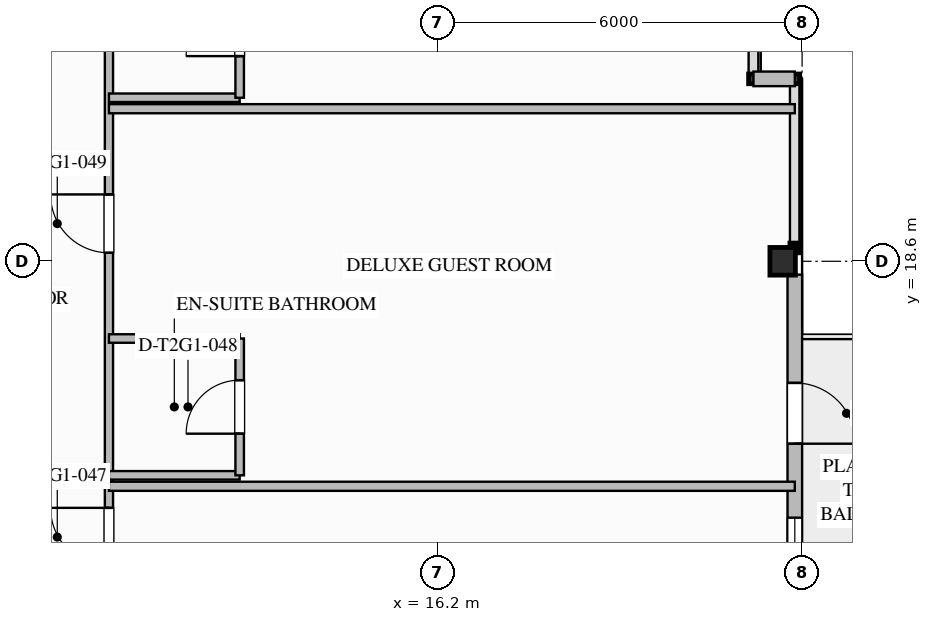
"""IFC4 building model, lengths in metres.
Left out: names, types, materials, properties, quantities, classifications, styles, units other than length and angle.
Written with IfcOpenShell. Run it as: python <this file> out.ifc"""

import sys

from ifc_helpers import new_model, si_unit, direction, frame, frame_2d, origin, origin_2d, place, context, subcontext, project, spatial, rectangle, i_section, extrude, element, fill, save


model = new_model("IFC4")
c1 = context("Model", 3, precision=1e-05, world=origin(), true_north=direction((0.0, 1.0)))
c2 = subcontext(c1, "Body", "Model", "MODEL_VIEW")
j1 = project(units=[si_unit("LENGTHUNIT", "METRE"), si_unit("PLANEANGLEUNIT", "RADIAN")], contexts=[c1])
p1 = place(None, origin())
s1 = spatial("IfcSite", under=j1, at=p1, CompositionType="ELEMENT")
p2 = place(p1, origin())
s2 = spatial("IfcBuilding", under=s1, at=p2, CompositionType="ELEMENT")
p3 = place(p2, frame((0.0, 0.0, 91.8)))
s3 = spatial("IfcBuildingStorey", under=s2, at=p3, CompositionType="ELEMENT", Elevation=91.8)
p4 = place(p3, frame((21.88, 18.6, 0.0), z_axis=(0.0, 0.0, 1.0), x_axis=(1.0, 0.0, 0.0)))
e1 = element("IfcColumn", 1, at=p4, inside=s3, PredefinedType="COLUMN", context=c2, shape_type="SweptSolid", body=[
    extrude(i_section(OverallWidth=0.418, OverallDepth=0.455, WebThickness=0.042, FlangeThickness=0.068, FilletRadius=0.03, at=origin_2d()), origin(), (0.0, 0.0, 1.0), 3.497),
])
p5 = place(p3, frame((22.08, 18.38, 0.0), z_axis=(0.0, 0.0, 1.0), x_axis=(0.0, -1.0, 0.0)))
e2 = element("IfcWall", 2, at=p5, inside=s3, PredefinedType="STANDARD", context=c2, shape_type="SweptSolid", body=[
    extrude(rectangle(XDim=7.361, YDim=0.24, at=frame_2d((3.68, 0.0))), origin(), (0.0, 0.0, 1.0), 2.629),
])
p6 = place(p5, frame((1.781, 0.0, 0.0)))
e3 = element("IfcOpeningElement", 3, at=p6, cuts=e2, PredefinedType="OPENING", context=c2, shape_type="SweptSolid", body=[
    extrude(rectangle(XDim=1.0, YDim=2.2, at=frame_2d((0.5, 1.1))), frame((0.0, 0.13, 0.0), z_axis=(0.0, -1.0, 0.0), x_axis=(1.0, 0.0, 0.0)), (0.0, 0.0, 1.0), 0.26),
])
p7 = place(p5, frame((3.997, 0.0, 0.75)))
e4 = element("IfcOpeningElement", 4, at=p7, cuts=e2, PredefinedType="OPENING", context=c2, shape_type="SweptSolid", body=[
    extrude(rectangle(XDim=1.8, YDim=1.779, at=frame_2d((0.9, 0.89))), frame((0.0, 0.13, 0.0), z_axis=(0.0, -1.0, 0.0), x_axis=(1.0, 0.0, 0.0)), (0.0, 0.0, 1.0), 0.26),
])
p8 = place(p3, frame((21.4, 21.6, 0.0), z_axis=(0.0, 0.0, 1.0), x_axis=(1.0, 0.0, 0.0)))
e5 = element("IfcWall", 5, at=p8, inside=s3, PredefinedType="STANDARD", context=c2, shape_type="SweptSolid", body=[
    extrude(rectangle(XDim=0.68, YDim=0.24, at=frame_2d((0.34, 0.0))), origin(), (0.0, 0.0, 1.0), 3.24),
])
p9 = place(p3, frame((10.8, 10.8, 0.0), z_axis=(0.0, 0.0, 1.0), x_axis=(0.0, 1.0, 0.0)))
e6 = element("IfcWall", 6, at=p9, inside=s3, PredefinedType="PARTITIONING", context=c2, shape_type="SweptSolid", body=[
    extrude(rectangle(XDim=32.4, YDim=0.135, at=frame_2d((16.2, 0.0))), origin(), (0.0, 0.0, 1.0), 3.24),
])
p10 = place(p9, frame((2.785, 0.0, 0.0)))
e7 = element("IfcOpeningElement", 7, at=p10, cuts=e6, PredefinedType="OPENING", context=c2, shape_type="SweptSolid", body=[
    extrude(rectangle(XDim=0.96, YDim=2.15, at=frame_2d((0.48, 1.075))), frame((0.0, 0.077, 0.0), z_axis=(0.0, -1.0, 0.0), x_axis=(1.0, 0.0, 0.0)), (0.0, 0.0, 1.0), 0.155),
])
p11 = place(p9, frame((7.939, 0.0, 0.0)))
e8 = element("IfcOpeningElement", 8, at=p11, cuts=e6, PredefinedType="OPENING", context=c2, shape_type="SweptSolid", body=[
    extrude(rectangle(XDim=0.96, YDim=2.15, at=frame_2d((0.48, 1.075))), frame((0.0, 0.077, 0.0), z_axis=(0.0, -1.0, 0.0), x_axis=(1.0, 0.0, 0.0)), (0.0, 0.0, 1.0), 0.155),
])
p12 = place(p9, frame((13.99, 0.0, 0.0)))
e9 = element("IfcOpeningElement", 9, at=p12, cuts=e6, PredefinedType="OPENING", context=c2, shape_type="SweptSolid", body=[
    extrude(rectangle(XDim=0.96, YDim=2.15, at=frame_2d((0.48, 1.075))), frame((0.0, 0.077, 0.0), z_axis=(0.0, -1.0, 0.0), x_axis=(1.0, 0.0, 0.0)), (0.0, 0.0, 1.0), 0.155),
])
p13 = place(p9, frame((18.635, 0.0, 0.0)))
e10 = element("IfcOpeningElement", 10, at=p13, cuts=e6, PredefinedType="OPENING", context=c2, shape_type="SweptSolid", body=[
    extrude(rectangle(XDim=1.02, YDim=2.15, at=frame_2d((0.51, 1.075))), frame((0.0, 0.077, 0.0), z_axis=(0.0, -1.0, 0.0), x_axis=(1.0, 0.0, 0.0)), (0.0, 0.0, 1.0), 0.155),
])
p14 = place(p9, frame((25.281, 0.0, 0.0)))
e11 = element("IfcOpeningElement", 11, at=p14, cuts=e6, PredefinedType="OPENING", context=c2, shape_type="SweptSolid", body=[
    extrude(rectangle(XDim=0.96, YDim=2.15, at=frame_2d((0.48, 1.075))), frame((0.0, 0.077, 0.0), z_axis=(0.0, -1.0, 0.0), x_axis=(1.0, 0.0, 0.0)), (0.0, 0.0, 1.0), 0.155),
])
p15 = place(p9, frame((30.435, 0.0, 0.0)))
e12 = element("IfcOpeningElement", 12, at=p15, cuts=e6, PredefinedType="OPENING", context=c2, shape_type="SweptSolid", body=[
    extrude(rectangle(XDim=0.96, YDim=2.15, at=frame_2d((0.48, 1.075))), frame((0.0, 0.077, 0.0), z_axis=(0.0, -1.0, 0.0), x_axis=(1.0, 0.0, 0.0)), (0.0, 0.0, 1.0), 0.155),
])
p16 = place(p3, frame((10.8, 14.9, 0.0), z_axis=(0.0, 0.0, 1.0), x_axis=(1.0, 0.0, 0.0)))
e13 = element("IfcWall", 13, at=p16, inside=s3, PredefinedType="PARTITIONING", context=c2, shape_type="SweptSolid", body=[
    extrude(rectangle(XDim=11.28, YDim=0.15, at=frame_2d((5.64, 0.0))), origin(), (0.0, 0.0, 1.0), 2.765),
])
for number, where, z_axis, x_axis in (
    (14, (10.8, 15.08, 0.0), (0.0, 0.0, 1.0), (1.0, 0.0, 0.0)),
    (15, (10.8, 17.33, 0.0), (0.0, 0.0, 1.0), (1.0, 0.0, 0.0)),
):
    element("IfcWall", number, at=place(p3, frame(where, z_axis=z_axis, x_axis=x_axis)), inside=s3, PredefinedType="PLUMBINGWALL", context=c2, shape_type="SweptSolid", body=[
        extrude(rectangle(XDim=2.15, YDim=0.14, at=frame_2d((1.075, 0.0))), origin(), (0.0, 0.0, 1.0), 3.24),
    ])
p17 = place(p3, frame((12.95, 15.08, 0.0), z_axis=(0.0, 0.0, 1.0), x_axis=(0.0, 1.0, 0.0)))
e16 = element("IfcWall", 16, at=p17, inside=s3, PredefinedType="PLUMBINGWALL", context=c2, shape_type="SweptSolid", body=[
    extrude(rectangle(XDim=2.25, YDim=0.14, at=frame_2d((1.125, 0.0))), origin(), (0.0, 0.0, 1.0), 3.24),
])
p18 = place(p17, frame((0.685, 0.0, 0.0)))
e17 = element("IfcOpeningElement", 17, at=p18, cuts=e16, PredefinedType="OPENING", context=c2, shape_type="SweptSolid", body=[
    extrude(rectangle(XDim=0.88, YDim=2.1, at=frame_2d((0.44, 1.05))), frame((0.0, 0.08, 0.0), z_axis=(0.0, -1.0, 0.0), x_axis=(1.0, 0.0, 0.0)), (0.0, 0.0, 1.0), 0.16),
])
p19 = place(p3, frame((10.8, 21.109, 0.0), z_axis=(0.0, 0.0, 1.0), x_axis=(1.0, 0.0, 0.0)))
e18 = element("IfcWall", 18, at=p19, inside=s3, PredefinedType="PARTITIONING", context=c2, shape_type="SweptSolid", body=[
    extrude(rectangle(XDim=11.28, YDim=0.15, at=frame_2d((5.64, 0.0))), origin(), (0.0, 0.0, 1.0), 3.24),
])
p20 = place(p3, frame((10.8, 21.289, 0.0), z_axis=(0.0, 0.0, 1.0), x_axis=(1.0, 0.0, 0.0)))
e19 = element("IfcWall", 19, at=p20, inside=s3, PredefinedType="PLUMBINGWALL", context=c2, shape_type="SweptSolid", body=[
    extrude(rectangle(XDim=2.15, YDim=0.14, at=frame_2d((1.075, 0.0))), origin(), (0.0, 0.0, 1.0), 3.24),
])
p21 = place(p3, frame((12.95, 21.289, 0.0), z_axis=(0.0, 0.0, 1.0), x_axis=(0.0, 1.0, 0.0)))
e20 = element("IfcWall", 20, at=p21, inside=s3, PredefinedType="PLUMBINGWALL", context=c2, shape_type="SweptSolid", body=[
    extrude(rectangle(XDim=2.25, YDim=0.14, at=frame_2d((1.125, 0.0))), origin(), (0.0, 0.0, 1.0), 3.24),
])
p22 = place(p21, frame((0.685, 0.0, 0.0)))
e21 = element("IfcOpeningElement", 21, at=p22, cuts=e20, PredefinedType="OPENING", context=c2, shape_type="SweptSolid", body=[
    extrude(rectangle(XDim=0.88, YDim=2.1, at=frame_2d((0.44, 1.05))), frame((0.0, 0.08, 0.0), z_axis=(0.0, -1.0, 0.0), x_axis=(1.0, 0.0, 0.0)), (0.0, 0.0, 1.0), 0.16),
])
p23 = place(p6, origin())
e22 = element("IfcDoor", 22, at=p23, inside=s3, OperationType="SINGLE_SWING_RIGHT", PredefinedType="DOOR", context=c2, shape_type="SweptSolid", body=[
    extrude(rectangle(XDim=1.0, YDim=2.2, at=frame_2d((0.5, 1.1))), frame((0.0, 0.025, 0.0), z_axis=(0.0, -1.0, 0.0), x_axis=(1.0, 0.0, 0.0)), (0.0, 0.0, 1.0), 0.05),
])
fill(e3, e22)
p24 = place(p7, origin())
e23 = element("IfcWindow", 23, at=p24, inside=s3, PartitioningType="SINGLE_PANEL", PredefinedType="WINDOW", context=c2, shape_type="SweptSolid", body=[
    extrude(rectangle(XDim=1.8, YDim=1.779, at=frame_2d((0.9, 0.89))), frame((0.0, 0.03, 0.0), z_axis=(0.0, -1.0, 0.0), x_axis=(1.0, 0.0, 0.0)), (0.0, 0.0, 1.0), 0.06),
])
fill(e4, e23)
p25 = place(p10, origin())
e24 = element("IfcDoor", 24, at=p25, inside=s3, OperationType="SINGLE_SWING_RIGHT", PredefinedType="DOOR", context=c2, shape_type="SweptSolid", body=[
    extrude(rectangle(XDim=0.96, YDim=2.15, at=frame_2d((0.48, 1.075))), frame((0.0, 0.025, 0.0), z_axis=(0.0, -1.0, 0.0), x_axis=(1.0, 0.0, 0.0)), (0.0, 0.0, 1.0), 0.05),
])
fill(e7, e24)
p26 = place(p18, origin())
e25 = element("IfcDoor", 25, at=p26, inside=s3, OperationType="SINGLE_SWING_LEFT", PredefinedType="DOOR", context=c2, shape_type="SweptSolid", body=[
    extrude(rectangle(XDim=0.88, YDim=2.1, at=frame_2d((0.44, 1.05))), frame((0.0, 0.025, 0.0), z_axis=(0.0, -1.0, 0.0), x_axis=(1.0, 0.0, 0.0)), (0.0, 0.0, 1.0), 0.05),
])
fill(e17, e25)
p27 = place(p11, origin())
e26 = element("IfcDoor", 26, at=p27, inside=s3, OperationType="SINGLE_SWING_RIGHT", PredefinedType="DOOR", context=c2, shape_type="SweptSolid", body=[
    extrude(rectangle(XDim=0.96, YDim=2.15, at=frame_2d((0.48, 1.075))), frame((0.0, 0.025, 0.0), z_axis=(0.0, -1.0, 0.0), x_axis=(1.0, 0.0, 0.0)), (0.0, 0.0, 1.0), 0.05),
])
fill(e8, e26)
p28 = place(p22, origin())
e27 = element("IfcDoor", 27, at=p28, inside=s3, OperationType="SINGLE_SWING_LEFT", PredefinedType="DOOR", context=c2, shape_type="SweptSolid", body=[
    extrude(rectangle(XDim=0.88, YDim=2.1, at=frame_2d((0.44, 1.05))), frame((0.0, 0.025, 0.0), z_axis=(0.0, -1.0, 0.0), x_axis=(1.0, 0.0, 0.0)), (0.0, 0.0, 1.0), 0.05),
])
fill(e21, e27)
save(model, sys.argv[1])
